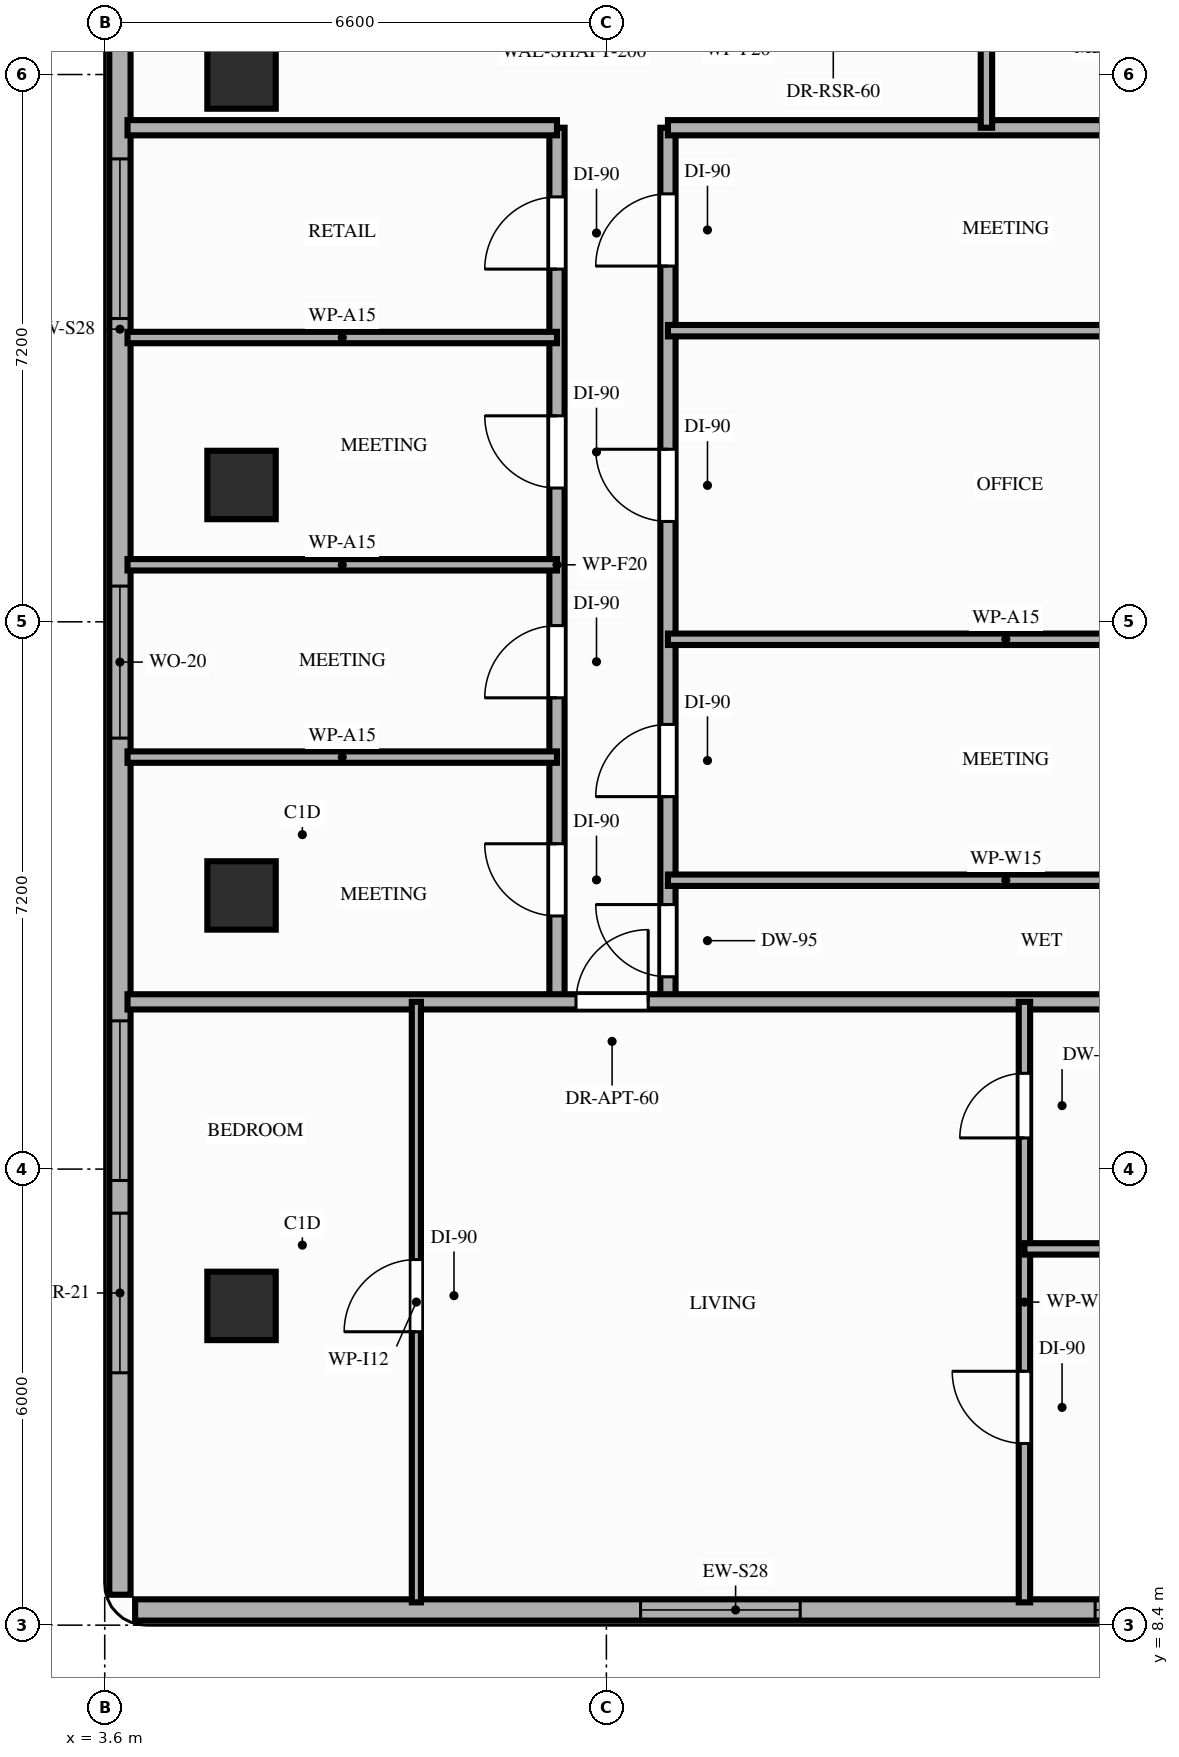
"""IFC4 building model, lengths in metres.
Left out: names, types, materials, properties, quantities, classifications, styles, units other than length and angle.
Written with IfcOpenShell. Run it as: python <this file> out.ifc"""

import sys

from ifc_helpers import new_model, si_unit, direction, frame, frame_2d, origin, origin_2d, place, context, subcontext, project, spatial, rectangle, extrude, element, fill, save


model = new_model("IFC4")
c1 = context("Model", 3, precision=1e-05, world=origin(), true_north=direction((0.0, 1.0)))
c2 = subcontext(c1, "Body", "Model", "MODEL_VIEW")
j1 = project(units=[si_unit("LENGTHUNIT", "METRE"), si_unit("PLANEANGLEUNIT", "RADIAN")], contexts=[c1])
p1 = place(None, origin())
s1 = spatial("IfcSite", under=j1, at=p1, CompositionType="ELEMENT")
p2 = place(p1, origin())
s2 = spatial("IfcBuilding", under=s1, at=p2, CompositionType="ELEMENT")
p3 = place(p2, frame((0.0, 0.0, 208.0)))
s3 = spatial("IfcBuildingStorey", under=s2, at=p3, CompositionType="ELEMENT", Elevation=208.0)
for number, where, z_axis, x_axis in (
    (1, (5.4, 12.6, 0.0), (0.0, 0.0, 1.0), (1.0, 0.0, 0.0)),
    (2, (5.4, 18.0, 0.0), (0.0, 0.0, 1.0), (1.0, 0.0, 0.0)),
    (3, (5.4, 23.4, 0.0), (0.0, 0.0, 1.0), (1.0, 0.0, 0.0)),
    (4, (5.4, 28.8, 0.0), (0.0, 0.0, 1.0), (1.0, 0.0, 0.0)),
):
    element("IfcColumn", number, at=place(p3, frame(where, z_axis=z_axis, x_axis=x_axis)), inside=s3, PredefinedType="COLUMN", context=c2, shape_type="SweptSolid", body=[
        extrude(rectangle(XDim=0.9, YDim=0.9, at=origin_2d()), origin(), (0.0, 0.0, 1.0), 3.2),
    ])
p4 = place(p3, frame((4.0, 8.6, 0.0), z_axis=(0.0, 0.0, 1.0), x_axis=(1.0, 0.0, 0.0)))
e5 = element("IfcWall", 5, at=p4, inside=s3, PredefinedType="STANDARD", context=c2, shape_type="SweptSolid", body=[
    extrude(rectangle(XDim=15.8, YDim=0.28, at=frame_2d((7.9, 0.0))), origin(), (0.0, 0.0, 1.0), 3.02),
])
p5 = place(p4, frame((6.65, 0.0, 0.85)))
e6 = element("IfcOpeningElement", 6, at=p5, cuts=e5, PredefinedType="OPENING", context=c2, shape_type="SweptSolid", body=[
    extrude(rectangle(XDim=2.1, YDim=1.8, at=frame_2d((1.05, 0.9))), frame((0.0, 0.15, 0.0), z_axis=(0.0, -1.0, 0.0), x_axis=(1.0, 0.0, 0.0)), (0.0, 0.0, 1.0), 0.3),
])
p6 = place(p4, frame((12.63, 0.0, 0.85)))
e7 = element("IfcOpeningElement", 7, at=p6, cuts=e5, PredefinedType="OPENING", context=c2, shape_type="SweptSolid", body=[
    extrude(rectangle(XDim=2.1, YDim=1.8, at=frame_2d((1.05, 0.9))), frame((0.0, 0.15, 0.0), z_axis=(0.0, -1.0, 0.0), x_axis=(1.0, 0.0, 0.0)), (0.0, 0.0, 1.0), 0.3),
])
p7 = place(p3, frame((3.8, 42.1, 0.0), z_axis=(0.0, 0.0, 1.0), x_axis=(0.0, -1.0, 0.0)))
e8 = element("IfcWall", 8, at=p7, inside=s3, PredefinedType="STANDARD", context=c2, shape_type="SweptSolid", body=[
    extrude(rectangle(XDim=33.3, YDim=0.28, at=frame_2d((16.65, 0.0))), origin(), (0.0, 0.0, 1.0), 2.71),
])
p8 = place(p7, frame((28.28, 0.0, 0.85)))
e9 = element("IfcOpeningElement", 9, at=p8, cuts=e8, PredefinedType="OPENING", context=c2, shape_type="SweptSolid", body=[
    extrude(rectangle(XDim=2.1, YDim=1.61, at=frame_2d((1.05, 0.805))), frame((0.0, 0.15, 0.0), z_axis=(0.0, -1.0, 0.0), x_axis=(1.0, 0.0, 0.0)), (0.0, 0.0, 1.0), 0.3),
])
p9 = place(p7, frame((25.75, 0.0, 0.85)))
e10 = element("IfcOpeningElement", 10, at=p9, cuts=e8, PredefinedType="OPENING", context=c2, shape_type="SweptSolid", body=[
    extrude(rectangle(XDim=2.1, YDim=1.61, at=frame_2d((1.05, 0.805))), frame((0.0, 0.15, 0.0), z_axis=(0.0, -1.0, 0.0), x_axis=(1.0, 0.0, 0.0)), (0.0, 0.0, 1.0), 0.3),
])
p10 = place(p7, frame((20.03, 0.0, 0.85)))
e11 = element("IfcOpeningElement", 11, at=p10, cuts=e8, PredefinedType="OPENING", context=c2, shape_type="SweptSolid", body=[
    extrude(rectangle(XDim=2.0, YDim=1.61, at=frame_2d((1.0, 0.805))), frame((0.0, 0.15, 0.0), z_axis=(0.0, -1.0, 0.0), x_axis=(1.0, 0.0, 0.0)), (0.0, 0.0, 1.0), 0.3),
])
p11 = place(p7, frame((14.41, 0.0, 0.85)))
e12 = element("IfcOpeningElement", 12, at=p11, cuts=e8, PredefinedType="OPENING", context=c2, shape_type="SweptSolid", body=[
    extrude(rectangle(XDim=2.1, YDim=1.61, at=frame_2d((1.05, 0.805))), frame((0.0, 0.15, 0.0), z_axis=(0.0, -1.0, 0.0), x_axis=(1.0, 0.0, 0.0)), (0.0, 0.0, 1.0), 0.3),
])
p12 = place(p7, frame((9.75, 0.0, 0.85)))
e13 = element("IfcOpeningElement", 13, at=p12, cuts=e8, PredefinedType="OPENING", context=c2, shape_type="SweptSolid", body=[
    extrude(rectangle(XDim=2.1, YDim=1.61, at=frame_2d((1.05, 0.805))), frame((0.0, 0.15, 0.0), z_axis=(0.0, -1.0, 0.0), x_axis=(1.0, 0.0, 0.0)), (0.0, 0.0, 1.0), 0.3),
])
p13 = place(p7, frame((3.65, 0.0, 0.85)))
e14 = element("IfcOpeningElement", 14, at=p13, cuts=e8, PredefinedType="OPENING", context=c2, shape_type="SweptSolid", body=[
    extrude(rectangle(XDim=2.1, YDim=1.61, at=frame_2d((1.05, 0.805))), frame((0.0, 0.15, 0.0), z_axis=(0.0, -1.0, 0.0), x_axis=(1.0, 0.0, 0.0)), (0.0, 0.0, 1.0), 0.3),
])
p14 = place(p3, frame((9.55, 16.6, 0.0), z_axis=(0.0, 0.0, 1.0), x_axis=(0.0, 1.0, 0.0)))
e15 = element("IfcWall", 15, at=p14, inside=s3, PredefinedType="PARTITIONING", context=c2, shape_type="SweptSolid", body=[
    extrude(rectangle(XDim=11.5, YDim=0.2, at=frame_2d((5.75, 0.0))), origin(), (0.0, 0.0, 1.0), 2.51),
])
p15 = place(p14, frame((1.13, 0.0, 0.0)))
e16 = element("IfcOpeningElement", 16, at=p15, cuts=e15, PredefinedType="OPENING", context=c2, shape_type="SweptSolid", body=[
    extrude(rectangle(XDim=0.95, YDim=2.15, at=frame_2d((0.475, 1.075))), frame((0.0, 0.11, 0.0), z_axis=(0.0, -1.0, 0.0), x_axis=(1.0, 0.0, 0.0)), (0.0, 0.0, 1.0), 0.22),
])
p16 = place(p14, frame((4.0, 0.0, 0.0)))
e17 = element("IfcOpeningElement", 17, at=p16, cuts=e15, PredefinedType="OPENING", context=c2, shape_type="SweptSolid", body=[
    extrude(rectangle(XDim=0.95, YDim=2.15, at=frame_2d((0.475, 1.075))), frame((0.0, 0.11, 0.0), z_axis=(0.0, -1.0, 0.0), x_axis=(1.0, 0.0, 0.0)), (0.0, 0.0, 1.0), 0.22),
])
p17 = place(p14, frame((6.76, 0.0, 0.0)))
e18 = element("IfcOpeningElement", 18, at=p17, cuts=e15, PredefinedType="OPENING", context=c2, shape_type="SweptSolid", body=[
    extrude(rectangle(XDim=0.95, YDim=2.15, at=frame_2d((0.475, 1.075))), frame((0.0, 0.11, 0.0), z_axis=(0.0, -1.0, 0.0), x_axis=(1.0, 0.0, 0.0)), (0.0, 0.0, 1.0), 0.22),
])
p18 = place(p14, frame((9.64, 0.0, 0.0)))
e19 = element("IfcOpeningElement", 19, at=p18, cuts=e15, PredefinedType="OPENING", context=c2, shape_type="SweptSolid", body=[
    extrude(rectangle(XDim=0.95, YDim=2.15, at=frame_2d((0.475, 1.075))), frame((0.0, 0.11, 0.0), z_axis=(0.0, -1.0, 0.0), x_axis=(1.0, 0.0, 0.0)), (0.0, 0.0, 1.0), 0.22),
])
p19 = place(p3, frame((11.01, 16.6, 0.0), z_axis=(0.0, 0.0, 1.0), x_axis=(0.0, 1.0, 0.0)))
e20 = element("IfcWall", 20, at=p19, inside=s3, PredefinedType="PARTITIONING", context=c2, shape_type="SweptSolid", body=[
    extrude(rectangle(XDim=11.5, YDim=0.2, at=frame_2d((5.75, 0.0))), origin(), (0.0, 0.0, 1.0), 2.51),
])
p20 = place(p19, frame((0.33, 0.0, 0.0)))
e21 = element("IfcOpeningElement", 21, at=p20, cuts=e20, PredefinedType="OPENING", context=c2, shape_type="SweptSolid", body=[
    extrude(rectangle(XDim=0.95, YDim=2.1, at=frame_2d((0.475, 1.05))), frame((0.0, 0.11, 0.0), z_axis=(0.0, -1.0, 0.0), x_axis=(1.0, 0.0, 0.0)), (0.0, 0.0, 1.0), 0.22),
])
p21 = place(p19, frame((2.7, 0.0, 0.0)))
e22 = element("IfcOpeningElement", 22, at=p21, cuts=e20, PredefinedType="OPENING", context=c2, shape_type="SweptSolid", body=[
    extrude(rectangle(XDim=0.95, YDim=2.15, at=frame_2d((0.475, 1.075))), frame((0.0, 0.11, 0.0), z_axis=(0.0, -1.0, 0.0), x_axis=(1.0, 0.0, 0.0)), (0.0, 0.0, 1.0), 0.22),
])
p22 = place(p19, frame((6.32, 0.0, 0.0)))
e23 = element("IfcOpeningElement", 23, at=p22, cuts=e20, PredefinedType="OPENING", context=c2, shape_type="SweptSolid", body=[
    extrude(rectangle(XDim=0.95, YDim=2.15, at=frame_2d((0.475, 1.075))), frame((0.0, 0.11, 0.0), z_axis=(0.0, -1.0, 0.0), x_axis=(1.0, 0.0, 0.0)), (0.0, 0.0, 1.0), 0.22),
])
p23 = place(p19, frame((9.68, 0.0, 0.0)))
e24 = element("IfcOpeningElement", 24, at=p23, cuts=e20, PredefinedType="OPENING", context=c2, shape_type="SweptSolid", body=[
    extrude(rectangle(XDim=0.95, YDim=2.15, at=frame_2d((0.475, 1.075))), frame((0.0, 0.11, 0.0), z_axis=(0.0, -1.0, 0.0), x_axis=(1.0, 0.0, 0.0)), (0.0, 0.0, 1.0), 0.22),
])
p24 = place(p3, frame((3.9, 16.6, 0.0), z_axis=(0.0, 0.0, 1.0), x_axis=(1.0, 0.0, 0.0)))
e25 = element("IfcWall", 25, at=p24, inside=s3, PredefinedType="PARTITIONING", context=c2, shape_type="SweptSolid", body=[
    extrude(rectangle(XDim=16.0, YDim=0.2, at=frame_2d((8.0, 0.0))), origin(), (0.0, 0.0, 1.0), 2.51),
])
p25 = place(p24, frame((5.9, 0.0, 0.0)))
e26 = element("IfcOpeningElement", 26, at=p25, cuts=e25, PredefinedType="OPENING", context=c2, shape_type="SweptSolid", body=[
    extrude(rectangle(XDim=0.95, YDim=2.15, at=frame_2d((0.475, 1.075))), frame((0.0, 0.11, 0.0), z_axis=(0.0, -1.0, 0.0), x_axis=(1.0, 0.0, 0.0)), (0.0, 0.0, 1.0), 0.22),
])
p26 = place(p3, frame((3.9, 28.1, 0.0), z_axis=(0.0, 0.0, 1.0), x_axis=(1.0, 0.0, 0.0)))
e27 = element("IfcWall", 27, at=p26, inside=s3, PredefinedType="PARTITIONING", context=c2, shape_type="SweptSolid", body=[
    extrude(rectangle(XDim=5.65, YDim=0.2, at=frame_2d((2.825, 0.0))), origin(), (0.0, 0.0, 1.0), 2.51),
])
p27 = place(p3, frame((11.01, 28.1, 0.0), z_axis=(0.0, 0.0, 1.0), x_axis=(1.0, 0.0, 0.0)))
e28 = element("IfcWall", 28, at=p27, inside=s3, PredefinedType="PARTITIONING", context=c2, shape_type="SweptSolid", body=[
    extrude(rectangle(XDim=8.89, YDim=0.2, at=frame_2d((4.445, 0.0))), origin(), (0.0, 0.0, 1.0), 2.51),
])
p28 = place(p3, frame((15.2, 28.1, 0.0), z_axis=(0.0, 0.0, 1.0), x_axis=(0.0, 1.0, 0.0)))
e29 = element("IfcWall", 29, at=p28, inside=s3, PredefinedType="PARTITIONING", context=c2, shape_type="SweptSolid", body=[
    extrude(rectangle(XDim=3.05, YDim=0.15, at=frame_2d((1.525, 0.0))), origin(), (0.0, 0.0, 1.0), 2.51),
])
p29 = place(p3, frame((7.7, 8.7, 0.0), z_axis=(0.0, 0.0, 1.0), x_axis=(0.0, 1.0, 0.0)))
e30 = element("IfcWall", 30, at=p29, inside=s3, PredefinedType="PARTITIONING", context=c2, shape_type="SweptSolid", body=[
    extrude(rectangle(XDim=7.9, YDim=0.12, at=frame_2d((3.95, 0.0))), origin(), (0.0, 0.0, 1.0), 2.51),
])
p30 = place(p29, frame((3.56, 0.0, 0.0)))
e31 = element("IfcOpeningElement", 31, at=p30, cuts=e30, PredefinedType="OPENING", context=c2, shape_type="SweptSolid", body=[
    extrude(rectangle(XDim=0.95, YDim=2.15, at=frame_2d((0.475, 1.075))), frame((0.0, 0.07, 0.0), z_axis=(0.0, -1.0, 0.0), x_axis=(1.0, 0.0, 0.0)), (0.0, 0.0, 1.0), 0.14),
])
p31 = place(p3, frame((15.7, 8.7, 0.0), z_axis=(0.0, 0.0, 1.0), x_axis=(0.0, 1.0, 0.0)))
e32 = element("IfcWall", 32, at=p31, inside=s3, PredefinedType="PARTITIONING", context=c2, shape_type="SweptSolid", body=[
    extrude(rectangle(XDim=7.9, YDim=0.15, at=frame_2d((3.95, 0.0))), origin(), (0.0, 0.0, 1.0), 2.51),
])
p32 = place(p31, frame((2.09, 0.0, 0.0)))
e33 = element("IfcOpeningElement", 33, at=p32, cuts=e32, PredefinedType="OPENING", context=c2, shape_type="SweptSolid", body=[
    extrude(rectangle(XDim=0.95, YDim=2.15, at=frame_2d((0.475, 1.075))), frame((0.0, 0.085, 0.0), z_axis=(0.0, -1.0, 0.0), x_axis=(1.0, 0.0, 0.0)), (0.0, 0.0, 1.0), 0.17),
])
p33 = place(p31, frame((6.11, 0.0, 0.0)))
e34 = element("IfcOpeningElement", 34, at=p33, cuts=e32, PredefinedType="OPENING", context=c2, shape_type="SweptSolid", body=[
    extrude(rectangle(XDim=0.85, YDim=2.1, at=frame_2d((0.425, 1.05))), frame((0.0, 0.085, 0.0), z_axis=(0.0, -1.0, 0.0), x_axis=(1.0, 0.0, 0.0)), (0.0, 0.0, 1.0), 0.17),
])
p34 = place(p3, frame((15.7, 13.35, 0.0), z_axis=(0.0, 0.0, 1.0), x_axis=(1.0, 0.0, 0.0)))
e35 = element("IfcWall", 35, at=p34, inside=s3, PredefinedType="PARTITIONING", context=c2, shape_type="SweptSolid", body=[
    extrude(rectangle(XDim=4.2, YDim=0.15, at=frame_2d((2.1, 0.0))), origin(), (0.0, 0.0, 1.0), 2.51),
])
for number, where, z_axis, x_axis in (
    (36, (3.9, 19.82, 0.0), (0.0, 0.0, 1.0), (1.0, 0.0, 0.0)),
    (37, (3.9, 22.35, 0.0), (0.0, 0.0, 1.0), (1.0, 0.0, 0.0)),
    (38, (3.9, 25.34, 0.0), (0.0, 0.0, 1.0), (1.0, 0.0, 0.0)),
):
    element("IfcWall", number, at=place(p3, frame(where, z_axis=z_axis, x_axis=x_axis)), inside=s3, PredefinedType="PARTITIONING", context=c2, shape_type="SweptSolid", body=[
        extrude(rectangle(XDim=5.65, YDim=0.15, at=frame_2d((2.825, 0.0))), origin(), (0.0, 0.0, 1.0), 2.51),
    ])
for number, where, z_axis, x_axis in (
    (39, (11.01, 18.2, 0.0), (0.0, 0.0, 1.0), (1.0, 0.0, 0.0)),
    (40, (11.01, 21.37, 0.0), (0.0, 0.0, 1.0), (1.0, 0.0, 0.0)),
    (41, (11.01, 25.43, 0.0), (0.0, 0.0, 1.0), (1.0, 0.0, 0.0)),
):
    element("IfcWall", number, at=place(p3, frame(where, z_axis=z_axis, x_axis=x_axis)), inside=s3, PredefinedType="PARTITIONING", context=c2, shape_type="SweptSolid", body=[
        extrude(rectangle(XDim=8.89, YDim=0.15, at=frame_2d((4.445, 0.0))), origin(), (0.0, 0.0, 1.0), 2.51),
    ])
p35 = place(p8, origin())
e42 = element("IfcWindow", 42, at=p35, inside=s3, PartitioningType="SINGLE_PANEL", PredefinedType="WINDOW", context=c2, shape_type="SweptSolid", body=[
    extrude(rectangle(XDim=2.1, YDim=1.61, at=frame_2d((1.05, 0.805))), frame((0.0, 0.03, 0.0), z_axis=(0.0, -1.0, 0.0), x_axis=(1.0, 0.0, 0.0)), (0.0, 0.0, 1.0), 0.06),
])
fill(e9, e42)
p36 = place(p5, origin())
e43 = element("IfcWindow", 43, at=p36, inside=s3, PartitioningType="SINGLE_PANEL", PredefinedType="WINDOW", context=c2, shape_type="SweptSolid", body=[
    extrude(rectangle(XDim=2.1, YDim=1.8, at=frame_2d((1.05, 0.9))), frame((0.0, 0.03, 0.0), z_axis=(0.0, -1.0, 0.0), x_axis=(1.0, 0.0, 0.0)), (0.0, 0.0, 1.0), 0.06),
])
fill(e6, e43)
p37 = place(p6, origin())
e44 = element("IfcWindow", 44, at=p37, inside=s3, PartitioningType="SINGLE_PANEL", PredefinedType="WINDOW", context=c2, shape_type="SweptSolid", body=[
    extrude(rectangle(XDim=2.1, YDim=1.8, at=frame_2d((1.05, 0.9))), frame((0.0, 0.03, 0.0), z_axis=(0.0, -1.0, 0.0), x_axis=(1.0, 0.0, 0.0)), (0.0, 0.0, 1.0), 0.06),
])
fill(e7, e44)
p38 = place(p9, origin())
e45 = element("IfcWindow", 45, at=p38, inside=s3, PartitioningType="SINGLE_PANEL", PredefinedType="WINDOW", context=c2, shape_type="SweptSolid", body=[
    extrude(rectangle(XDim=2.1, YDim=1.61, at=frame_2d((1.05, 0.805))), frame((0.0, 0.03, 0.0), z_axis=(0.0, -1.0, 0.0), x_axis=(1.0, 0.0, 0.0)), (0.0, 0.0, 1.0), 0.06),
])
fill(e10, e45)
p39 = place(p10, origin())
e46 = element("IfcWindow", 46, at=p39, inside=s3, PartitioningType="SINGLE_PANEL", PredefinedType="WINDOW", context=c2, shape_type="SweptSolid", body=[
    extrude(rectangle(XDim=2.0, YDim=1.61, at=frame_2d((1.0, 0.805))), frame((0.0, 0.03, 0.0), z_axis=(0.0, -1.0, 0.0), x_axis=(1.0, 0.0, 0.0)), (0.0, 0.0, 1.0), 0.06),
])
fill(e11, e46)
p40 = place(p11, origin())
e47 = element("IfcWindow", 47, at=p40, inside=s3, PartitioningType="SINGLE_PANEL", PredefinedType="WINDOW", context=c2, shape_type="SweptSolid", body=[
    extrude(rectangle(XDim=2.1, YDim=1.61, at=frame_2d((1.05, 0.805))), frame((0.0, 0.03, 0.0), z_axis=(0.0, -1.0, 0.0), x_axis=(1.0, 0.0, 0.0)), (0.0, 0.0, 1.0), 0.06),
])
fill(e12, e47)
p41 = place(p25, origin())
e48 = element("IfcDoor", 48, at=p41, inside=s3, OperationType="SINGLE_SWING_RIGHT", PredefinedType="DOOR", context=c2, shape_type="SweptSolid", body=[
    extrude(rectangle(XDim=0.95, YDim=2.15, at=frame_2d((0.475, 1.075))), frame((0.0, 0.025, 0.0), z_axis=(0.0, -1.0, 0.0), x_axis=(1.0, 0.0, 0.0)), (0.0, 0.0, 1.0), 0.05),
])
fill(e26, e48)
p42 = place(p30, origin())
e49 = element("IfcDoor", 49, at=p42, inside=s3, OperationType="SINGLE_SWING_LEFT", PredefinedType="DOOR", context=c2, shape_type="SweptSolid", body=[
    extrude(rectangle(XDim=0.95, YDim=2.15, at=frame_2d((0.475, 1.075))), frame((0.0, 0.025, 0.0), z_axis=(0.0, -1.0, 0.0), x_axis=(1.0, 0.0, 0.0)), (0.0, 0.0, 1.0), 0.05),
])
fill(e31, e49)
p43 = place(p32, origin())
e50 = element("IfcDoor", 50, at=p43, inside=s3, OperationType="SINGLE_SWING_RIGHT", PredefinedType="DOOR", context=c2, shape_type="SweptSolid", body=[
    extrude(rectangle(XDim=0.95, YDim=2.15, at=frame_2d((0.475, 1.075))), frame((0.0, 0.025, 0.0), z_axis=(0.0, -1.0, 0.0), x_axis=(1.0, 0.0, 0.0)), (0.0, 0.0, 1.0), 0.05),
])
fill(e33, e50)
p44 = place(p33, origin())
e51 = element("IfcDoor", 51, at=p44, inside=s3, OperationType="SINGLE_SWING_LEFT", PredefinedType="DOOR", context=c2, shape_type="SweptSolid", body=[
    extrude(rectangle(XDim=0.85, YDim=2.1, at=frame_2d((0.425, 1.05))), frame((0.0, 0.025, 0.0), z_axis=(0.0, -1.0, 0.0), x_axis=(1.0, 0.0, 0.0)), (0.0, 0.0, 1.0), 0.05),
])
fill(e34, e51)
p45 = place(p15, origin())
e52 = element("IfcDoor", 52, at=p45, inside=s3, OperationType="SINGLE_SWING_RIGHT", PredefinedType="DOOR", context=c2, shape_type="SweptSolid", body=[
    extrude(rectangle(XDim=0.95, YDim=2.15, at=frame_2d((0.475, 1.075))), frame((0.0, 0.025, 0.0), z_axis=(0.0, -1.0, 0.0), x_axis=(1.0, 0.0, 0.0)), (0.0, 0.0, 1.0), 0.05),
])
fill(e16, e52)
p46 = place(p16, origin())
e53 = element("IfcDoor", 53, at=p46, inside=s3, OperationType="SINGLE_SWING_LEFT", PredefinedType="DOOR", context=c2, shape_type="SweptSolid", body=[
    extrude(rectangle(XDim=0.95, YDim=2.15, at=frame_2d((0.475, 1.075))), frame((0.0, 0.025, 0.0), z_axis=(0.0, -1.0, 0.0), x_axis=(1.0, 0.0, 0.0)), (0.0, 0.0, 1.0), 0.05),
])
fill(e17, e53)
p47 = place(p17, origin())
e54 = element("IfcDoor", 54, at=p47, inside=s3, OperationType="SINGLE_SWING_RIGHT", PredefinedType="DOOR", context=c2, shape_type="SweptSolid", body=[
    extrude(rectangle(XDim=0.95, YDim=2.15, at=frame_2d((0.475, 1.075))), frame((0.0, 0.025, 0.0), z_axis=(0.0, -1.0, 0.0), x_axis=(1.0, 0.0, 0.0)), (0.0, 0.0, 1.0), 0.05),
])
fill(e18, e54)
p48 = place(p18, origin())
e55 = element("IfcDoor", 55, at=p48, inside=s3, OperationType="SINGLE_SWING_LEFT", PredefinedType="DOOR", context=c2, shape_type="SweptSolid", body=[
    extrude(rectangle(XDim=0.95, YDim=2.15, at=frame_2d((0.475, 1.075))), frame((0.0, 0.025, 0.0), z_axis=(0.0, -1.0, 0.0), x_axis=(1.0, 0.0, 0.0)), (0.0, 0.0, 1.0), 0.05),
])
fill(e19, e55)
p49 = place(p20, origin())
e56 = element("IfcDoor", 56, at=p49, inside=s3, OperationType="SINGLE_SWING_RIGHT", PredefinedType="DOOR", context=c2, shape_type="SweptSolid", body=[
    extrude(rectangle(XDim=0.95, YDim=2.1, at=frame_2d((0.475, 1.05))), frame((0.0, 0.025, 0.0), z_axis=(0.0, -1.0, 0.0), x_axis=(1.0, 0.0, 0.0)), (0.0, 0.0, 1.0), 0.05),
])
fill(e21, e56)
p50 = place(p21, origin())
e57 = element("IfcDoor", 57, at=p50, inside=s3, OperationType="SINGLE_SWING_LEFT", PredefinedType="DOOR", context=c2, shape_type="SweptSolid", body=[
    extrude(rectangle(XDim=0.95, YDim=2.15, at=frame_2d((0.475, 1.075))), frame((0.0, 0.025, 0.0), z_axis=(0.0, -1.0, 0.0), x_axis=(1.0, 0.0, 0.0)), (0.0, 0.0, 1.0), 0.05),
])
fill(e22, e57)
p51 = place(p22, origin())
e58 = element("IfcDoor", 58, at=p51, inside=s3, OperationType="SINGLE_SWING_RIGHT", PredefinedType="DOOR", context=c2, shape_type="SweptSolid", body=[
    extrude(rectangle(XDim=0.95, YDim=2.15, at=frame_2d((0.475, 1.075))), frame((0.0, 0.025, 0.0), z_axis=(0.0, -1.0, 0.0), x_axis=(1.0, 0.0, 0.0)), (0.0, 0.0, 1.0), 0.05),
])
fill(e23, e58)
p52 = place(p23, origin())
e59 = element("IfcDoor", 59, at=p52, inside=s3, OperationType="SINGLE_SWING_LEFT", PredefinedType="DOOR", context=c2, shape_type="SweptSolid", body=[
    extrude(rectangle(XDim=0.95, YDim=2.15, at=frame_2d((0.475, 1.075))), frame((0.0, 0.025, 0.0), z_axis=(0.0, -1.0, 0.0), x_axis=(1.0, 0.0, 0.0)), (0.0, 0.0, 1.0), 0.05),
])
fill(e24, e59)
save(model, sys.argv[1])
